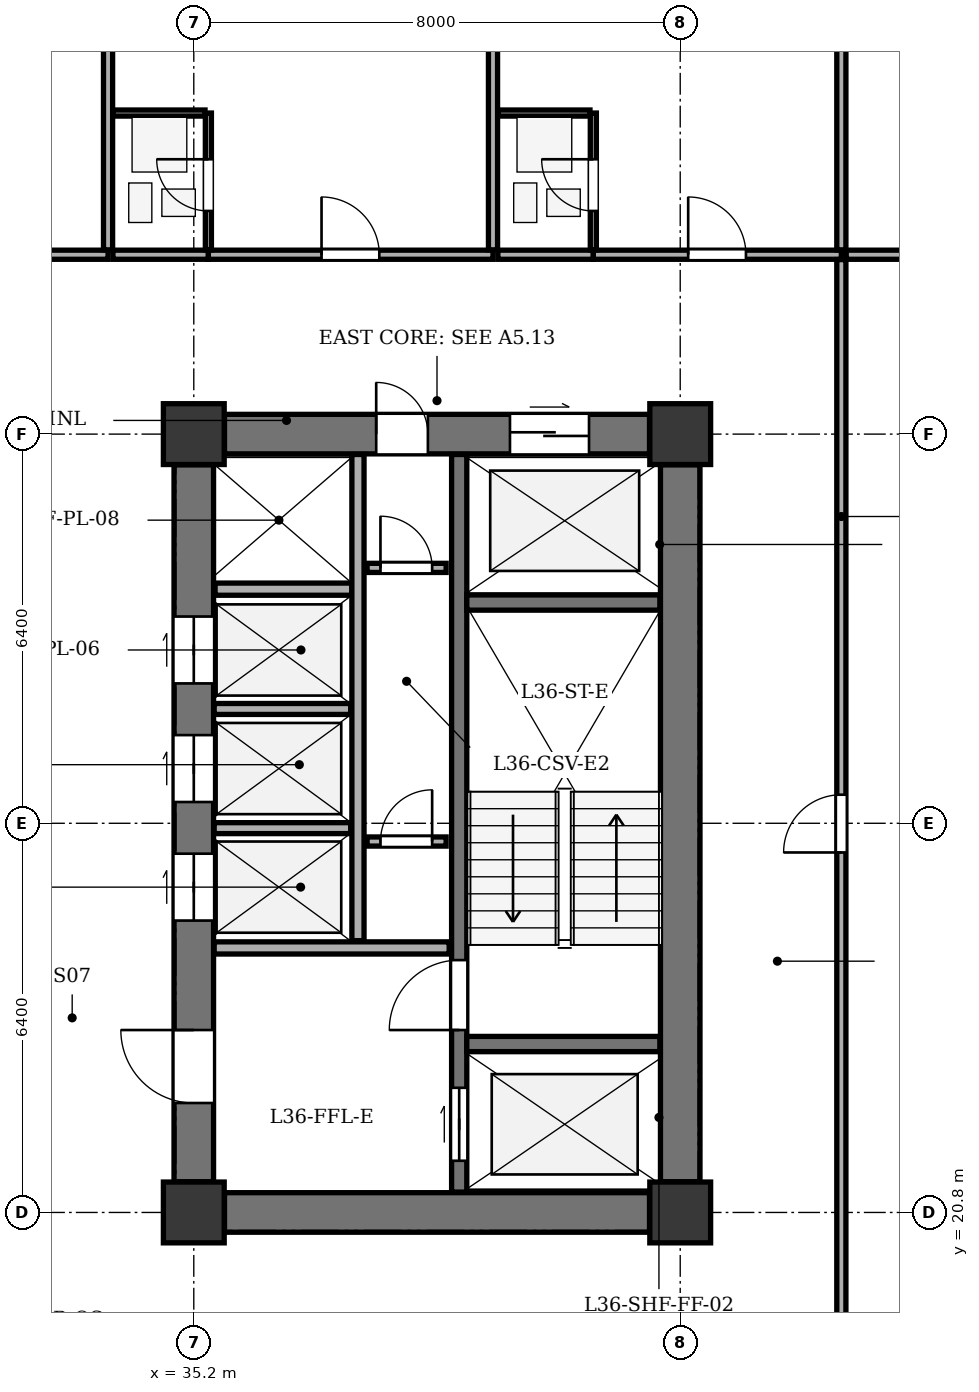
"""IFC4 building model, lengths in metres.
Left out: names, types, materials, properties, quantities, classifications, styles, units other than length and angle.
Written with IfcOpenShell. Run it as: python <this file> out.ifc"""

import sys

from ifc_helpers import new_model, si_unit, direction, frame, frame_2d, origin, origin_2d, place, context, subcontext, project, spatial, rectangle, extrude, element, fill, save


model = new_model("IFC4")
c1 = context("Model", 3, precision=1e-05, world=origin(), true_north=direction((0.0, 1.0)))
c2 = subcontext(c1, "Body", "Model", "MODEL_VIEW")
j1 = project(units=[si_unit("LENGTHUNIT", "METRE"), si_unit("PLANEANGLEUNIT", "RADIAN")], contexts=[c1])
p1 = place(None, origin())
s1 = spatial("IfcSite", under=j1, at=p1, CompositionType="ELEMENT")
p2 = place(p1, origin())
s2 = spatial("IfcBuilding", under=s1, at=p2, CompositionType="ELEMENT")
p3 = place(p2, frame((0.0, 0.0, 144.8)))
s3 = spatial("IfcBuildingStorey", under=s2, at=p3, CompositionType="ELEMENT", Elevation=144.8)
for number, where, z_axis, x_axis in (
    (1, (35.2, 20.8, 0.0), (0.0, 0.0, 1.0), (1.0, 0.0, 0.0)),
    (2, (43.2, 20.8, 0.0), (0.0, 0.0, 1.0), (1.0, 0.0, 0.0)),
    (3, (35.2, 33.6, 0.0), (0.0, 0.0, 1.0), (1.0, 0.0, 0.0)),
    (4, (43.2, 33.6, 0.0), (0.0, 0.0, 1.0), (1.0, 0.0, 0.0)),
):
    element("IfcColumn", number, at=place(p3, frame(where, z_axis=z_axis, x_axis=x_axis)), inside=s3, PredefinedType="COLUMN", context=c2, shape_type="SweptSolid", body=[
        extrude(rectangle(XDim=1.0, YDim=1.0, at=origin_2d()), origin(), (0.0, 0.0, 1.0), 3.5),
    ])
p4 = place(p3, frame((43.2, 21.305, 0.0), z_axis=(0.0, 0.0, 1.0), x_axis=(0.0, 1.0, 0.0)))
e5 = element("IfcWall", 5, at=p4, inside=s3, PredefinedType="SHEAR", context=c2, shape_type="SweptSolid", body=[
    extrude(rectangle(XDim=11.79, YDim=0.65, at=frame_2d((5.895, 0.0))), origin(), (0.0, 0.0, 1.0), 3.2),
])
p5 = place(p3, frame((35.705, 20.8, 0.0), z_axis=(0.0, 0.0, 1.0), x_axis=(1.0, 0.0, 0.0)))
e6 = element("IfcWall", 6, at=p5, inside=s3, PredefinedType="SHEAR", context=c2, shape_type="SweptSolid", body=[
    extrude(rectangle(XDim=6.99, YDim=0.65, at=frame_2d((3.495, 0.0))), origin(), (0.0, 0.0, 1.0), 3.2),
])
p6 = place(p3, frame((35.705, 33.6, 0.0), z_axis=(0.0, 0.0, 1.0), x_axis=(1.0, 0.0, 0.0)))
e7 = element("IfcWall", 7, at=p6, inside=s3, PredefinedType="SHEAR", context=c2, shape_type="SweptSolid", body=[
    extrude(rectangle(XDim=6.99, YDim=0.65, at=frame_2d((3.495, 0.0))), origin(), (0.0, 0.0, 1.0), 3.2),
])
p7 = place(p6, frame((4.695, 0.0, 0.0)))
e8 = element("IfcOpeningElement", 8, at=p7, cuts=e7, PredefinedType="OPENING", context=c2, shape_type="SweptSolid", body=[
    extrude(rectangle(XDim=1.3, YDim=2.15, at=frame_2d((0.65, 1.075))), frame((0.0, 0.335, 0.0), z_axis=(0.0, -1.0, 0.0), x_axis=(1.0, 0.0, 0.0)), (0.0, 0.0, 1.0), 0.67),
])
p8 = place(p6, frame((2.495, 0.0, 0.0)))
e9 = element("IfcOpeningElement", 9, at=p8, cuts=e7, PredefinedType="OPENING", context=c2, shape_type="SweptSolid", body=[
    extrude(rectangle(XDim=0.85, YDim=2.02, at=frame_2d((0.425, 1.01))), frame((0.0, 0.335, 0.0), z_axis=(0.0, -1.0, 0.0), x_axis=(1.0, 0.0, 0.0)), (0.0, 0.0, 1.0), 0.67),
])
p9 = place(p3, frame((35.2, 21.305, 0.0), z_axis=(0.0, 0.0, 1.0), x_axis=(0.0, 1.0, 0.0)))
e10 = element("IfcWall", 10, at=p9, inside=s3, PredefinedType="SHEAR", context=c2, shape_type="SweptSolid", body=[
    extrude(rectangle(XDim=11.79, YDim=0.65, at=frame_2d((5.895, 0.0))), origin(), (0.0, 0.0, 1.0), 3.2),
])
p10 = place(p9, frame((1.295, 0.0, 0.0)))
e11 = element("IfcOpeningElement", 11, at=p10, cuts=e10, PredefinedType="OPENING", context=c2, shape_type="SweptSolid", body=[
    extrude(rectangle(XDim=1.2, YDim=2.15, at=frame_2d((0.6, 1.075))), frame((0.0, 0.335, 0.0), z_axis=(0.0, -1.0, 0.0), x_axis=(1.0, 0.0, 0.0)), (0.0, 0.0, 1.0), 0.67),
])
p11 = place(p9, frame((4.295, 0.0, 0.0)))
e12 = element("IfcOpeningElement", 12, at=p11, cuts=e10, PredefinedType="OPENING", context=c2, shape_type="SweptSolid", body=[
    extrude(rectangle(XDim=1.1, YDim=2.1, at=frame_2d((0.55, 1.05))), frame((0.0, 0.335, 0.0), z_axis=(0.0, -1.0, 0.0), x_axis=(1.0, 0.0, 0.0)), (0.0, 0.0, 1.0), 0.67),
])
p12 = place(p9, frame((6.245, 0.0, 0.0)))
e13 = element("IfcOpeningElement", 13, at=p12, cuts=e10, PredefinedType="OPENING", context=c2, shape_type="SweptSolid", body=[
    extrude(rectangle(XDim=1.1, YDim=2.1, at=frame_2d((0.55, 1.05))), frame((0.0, 0.335, 0.0), z_axis=(0.0, -1.0, 0.0), x_axis=(1.0, 0.0, 0.0)), (0.0, 0.0, 1.0), 0.67),
])
p13 = place(p9, frame((8.195, 0.0, 0.0)))
e14 = element("IfcOpeningElement", 14, at=p13, cuts=e10, PredefinedType="OPENING", context=c2, shape_type="SweptSolid", body=[
    extrude(rectangle(XDim=1.1, YDim=2.1, at=frame_2d((0.55, 1.05))), frame((0.0, 0.335, 0.0), z_axis=(0.0, -1.0, 0.0), x_axis=(1.0, 0.0, 0.0)), (0.0, 0.0, 1.0), 0.67),
])
p14 = place(p3, frame((39.565, 21.135, 0.0), z_axis=(0.0, 0.0, 1.0), x_axis=(0.0, 1.0, 0.0)))
e15 = element("IfcWall", 15, at=p14, inside=s3, PredefinedType="SHEAR", context=c2, shape_type="SweptSolid", body=[
    extrude(rectangle(XDim=12.13, YDim=0.25, at=frame_2d((6.065, 0.0))), origin(), (0.0, 0.0, 1.0), 3.2),
])
p15 = place(p14, frame((0.515, 0.0, 0.0)))
e16 = element("IfcOpeningElement", 16, at=p15, cuts=e15, PredefinedType="OPENING", context=c2, shape_type="SweptSolid", body=[
    extrude(rectangle(XDim=1.2, YDim=2.15, at=frame_2d((0.6, 1.075))), frame((0.0, 0.135, 0.0), z_axis=(0.0, -1.0, 0.0), x_axis=(1.0, 0.0, 0.0)), (0.0, 0.0, 1.0), 0.27),
])
p16 = place(p14, frame((2.665, 0.0, 0.0)))
e17 = element("IfcOpeningElement", 17, at=p16, cuts=e15, PredefinedType="OPENING", context=c2, shape_type="SweptSolid", body=[
    extrude(rectangle(XDim=1.15, YDim=2.15, at=frame_2d((0.575, 1.075))), frame((0.0, 0.135, 0.0), z_axis=(0.0, -1.0, 0.0), x_axis=(1.0, 0.0, 0.0)), (0.0, 0.0, 1.0), 0.27),
])
for number, where, z_axis, x_axis in (
    (18, (39.69, 23.57, 0.0), (0.0, 0.0, 1.0), (1.0, 0.0, 0.0)),
    (19, (39.69, 30.83, 0.0), (0.0, 0.0, 1.0), (1.0, 0.0, 0.0)),
):
    element("IfcWall", number, at=place(p3, frame(where, z_axis=z_axis, x_axis=x_axis)), inside=s3, PredefinedType="SHEAR", context=c2, shape_type="SweptSolid", body=[
        extrude(rectangle(XDim=3.175, YDim=0.25, at=frame_2d((1.587, 0.0))), origin(), (0.0, 0.0, 1.0), 3.2),
    ])
p17 = place(p3, frame((35.535, 25.15, 0.0), z_axis=(0.0, 0.0, 1.0), x_axis=(1.0, 0.0, 0.0)))
e20 = element("IfcWall", 20, at=p17, inside=s3, PredefinedType="SOLIDWALL", context=c2, shape_type="SweptSolid", body=[
    extrude(rectangle(XDim=3.865, YDim=0.2, at=frame_2d((1.933, 0.0))), origin(), (0.0, 0.0, 1.0), 3.2),
])
p18 = place(p3, frame((35.55, 31.05, 0.0), z_axis=(0.0, 0.0, 1.0), x_axis=(1.0, 0.0, 0.0)))
e21 = element("IfcWall", 21, at=p18, inside=s3, PredefinedType="SOLIDWALL", context=c2, shape_type="SweptSolid", body=[
    extrude(rectangle(XDim=2.25, YDim=0.2, at=frame_2d((1.125, 0.0))), origin(), (0.0, 0.0, 1.0), 3.2),
])
p19 = place(p3, frame((37.9, 25.27, 0.0), z_axis=(0.0, 0.0, 1.0), x_axis=(0.0, 1.0, 0.0)))
e22 = element("IfcWall", 22, at=p19, inside=s3, PredefinedType="SOLIDWALL", context=c2, shape_type="SweptSolid", body=[
    extrude(rectangle(XDim=7.995, YDim=0.2, at=frame_2d((3.998, 0.0))), origin(), (0.0, 0.0, 1.0), 3.2),
])
for number, where, z_axis, x_axis in (
    (23, (35.535, 27.12, 0.0), (0.0, 0.0, 1.0), (1.0, 0.0, 0.0)),
    (24, (35.535, 29.08, 0.0), (0.0, 0.0, 1.0), (1.0, 0.0, 0.0)),
):
    element("IfcWall", number, at=place(p3, frame(where, z_axis=z_axis, x_axis=x_axis)), inside=s3, PredefinedType="PARTITIONING", context=c2, shape_type="SweptSolid", body=[
        extrude(rectangle(XDim=2.245, YDim=0.18, at=frame_2d((1.123, 0.0))), origin(), (0.0, 0.0, 1.0), 3.2),
    ])
p20 = place(p3, frame((38.05, 26.9, 0.0), z_axis=(0.0, 0.0, 1.0), x_axis=(1.0, 0.0, 0.0)))
e25 = element("IfcWall", 25, at=p20, inside=s3, PredefinedType="PARTITIONING", context=c2, shape_type="SweptSolid", body=[
    extrude(rectangle(XDim=1.3, YDim=0.15, at=frame_2d((0.65, 0.0))), origin(), (0.0, 0.0, 1.0), 3.2),
])
p21 = place(p20, frame((0.22, 0.0, 0.0)))
e26 = element("IfcOpeningElement", 26, at=p21, cuts=e25, PredefinedType="OPENING", context=c2, shape_type="SweptSolid", body=[
    extrude(rectangle(XDim=0.85, YDim=2.02, at=frame_2d((0.425, 1.01))), frame((0.0, 0.085, 0.0), z_axis=(0.0, -1.0, 0.0), x_axis=(1.0, 0.0, 0.0)), (0.0, 0.0, 1.0), 0.17),
])
p22 = place(p3, frame((38.05, 31.4, 0.0), z_axis=(0.0, 0.0, 1.0), x_axis=(1.0, 0.0, 0.0)))
e27 = element("IfcWall", 27, at=p22, inside=s3, PredefinedType="PARTITIONING", context=c2, shape_type="SweptSolid", body=[
    extrude(rectangle(XDim=1.3, YDim=0.15, at=frame_2d((0.65, 0.0))), origin(), (0.0, 0.0, 1.0), 3.2),
])
p23 = place(p22, frame((0.22, 0.0, 0.0)))
e28 = element("IfcOpeningElement", 28, at=p23, cuts=e27, PredefinedType="OPENING", context=c2, shape_type="SweptSolid", body=[
    extrude(rectangle(XDim=0.85, YDim=2.02, at=frame_2d((0.425, 1.01))), frame((0.0, 0.085, 0.0), z_axis=(0.0, -1.0, 0.0), x_axis=(1.0, 0.0, 0.0)), (0.0, 0.0, 1.0), 0.17),
])
p24 = place(p3, frame((29.109, 36.55, 0.0), z_axis=(0.0, 0.0, 1.0), x_axis=(1.0, 0.0, 0.0)))
e29 = element("IfcWall", 29, at=p24, inside=s3, PredefinedType="PARTITIONING", context=c2, shape_type="SweptSolid", body=[
    extrude(rectangle(XDim=4.681, YDim=0.15, at=frame_2d((2.341, 0.0))), origin(), (0.0, 0.0, 1.0), 3.2),
])
p25 = place(p24, frame((1.861, 0.0, 0.0)))
e30 = element("IfcOpeningElement", 30, at=p25, cuts=e29, PredefinedType="OPENING", context=c2, shape_type="SweptSolid", body=[
    extrude(rectangle(XDim=0.95, YDim=2.1, at=frame_2d((0.475, 1.05))), frame((0.0, 0.085, 0.0), z_axis=(0.0, -1.0, 0.0), x_axis=(1.0, 0.0, 0.0)), (0.0, 0.0, 1.0), 0.17),
])
p26 = place(p3, frame((33.79, 36.63, 0.0), z_axis=(0.0, 0.0, 1.0), x_axis=(0.0, 1.0, 0.0)))
e31 = element("IfcWall", 31, at=p26, inside=s3, PredefinedType="PARTITIONING", context=c2, shape_type="SweptSolid", body=[
    extrude(rectangle(XDim=9.495, YDim=0.15, at=frame_2d((4.748, 0.0))), origin(), (0.0, 0.0, 1.0), 2.785),
])
p27 = place(p3, frame((33.87, 36.55, 0.0), z_axis=(0.0, 0.0, 1.0), x_axis=(1.0, 0.0, 0.0)))
e32 = element("IfcWall", 32, at=p27, inside=s3, PredefinedType="PARTITIONING", context=c2, shape_type="SweptSolid", body=[
    extrude(rectangle(XDim=1.57, YDim=0.15, at=frame_2d((0.785, 0.0))), origin(), (0.0, 0.0, 1.0), 3.2),
])
p28 = place(p3, frame((35.44, 36.55, 0.0), z_axis=(0.0, 0.0, 1.0), x_axis=(1.0, 0.0, 0.0)))
e33 = element("IfcWall", 33, at=p28, inside=s3, PredefinedType="PARTITIONING", context=c2, shape_type="SweptSolid", body=[
    extrude(rectangle(XDim=4.681, YDim=0.15, at=frame_2d((2.341, 0.0))), origin(), (0.0, 0.0, 1.0), 3.2),
])
p29 = place(p28, frame((1.861, 0.0, 0.0)))
e34 = element("IfcOpeningElement", 34, at=p29, cuts=e33, PredefinedType="OPENING", context=c2, shape_type="SweptSolid", body=[
    extrude(rectangle(XDim=0.95, YDim=2.1, at=frame_2d((0.475, 1.05))), frame((0.0, 0.085, 0.0), z_axis=(0.0, -1.0, 0.0), x_axis=(1.0, 0.0, 0.0)), (0.0, 0.0, 1.0), 0.17),
])
p30 = place(p3, frame((35.44, 36.63, 0.0), z_axis=(0.0, 0.0, 1.0), x_axis=(0.0, 1.0, 0.0)))
e35 = element("IfcWall", 35, at=p30, inside=s3, PredefinedType="PARTITIONING", context=c2, shape_type="SweptSolid", body=[
    extrude(rectangle(XDim=2.25, YDim=0.1, at=frame_2d((1.125, 0.0))), origin(), (0.0, 0.0, 1.0), 2.535),
])
p31 = place(p30, frame((0.64, 0.0, 0.0)))
e36 = element("IfcOpeningElement", 36, at=p31, cuts=e35, PredefinedType="OPENING", context=c2, shape_type="SweptSolid", body=[
    extrude(rectangle(XDim=0.85, YDim=2.05, at=frame_2d((0.425, 1.025))), frame((0.0, 0.06, 0.0), z_axis=(0.0, -1.0, 0.0), x_axis=(1.0, 0.0, 0.0)), (0.0, 0.0, 1.0), 0.12),
])
p32 = place(p3, frame((33.87, 38.88, 0.0), z_axis=(0.0, 0.0, 1.0), x_axis=(1.0, 0.0, 0.0)))
e37 = element("IfcWall", 37, at=p32, inside=s3, PredefinedType="PARTITIONING", context=c2, shape_type="SweptSolid", body=[
    extrude(rectangle(XDim=1.515, YDim=0.1, at=frame_2d((0.757, 0.0))), origin(), (0.0, 0.0, 1.0), 3.2),
])
p33 = place(p3, frame((40.121, 36.63, 0.0), z_axis=(0.0, 0.0, 1.0), x_axis=(0.0, 1.0, 0.0)))
e38 = element("IfcWall", 38, at=p33, inside=s3, PredefinedType="PARTITIONING", context=c2, shape_type="SweptSolid", body=[
    extrude(rectangle(XDim=9.495, YDim=0.15, at=frame_2d((4.748, 0.0))), origin(), (0.0, 0.0, 1.0), 3.2),
])
p34 = place(p3, frame((40.201, 36.55, 0.0), z_axis=(0.0, 0.0, 1.0), x_axis=(1.0, 0.0, 0.0)))
e39 = element("IfcWall", 39, at=p34, inside=s3, PredefinedType="PARTITIONING", context=c2, shape_type="SweptSolid", body=[
    extrude(rectangle(XDim=1.57, YDim=0.15, at=frame_2d((0.785, 0.0))), origin(), (0.0, 0.0, 1.0), 3.2),
])
p35 = place(p3, frame((41.771, 36.55, 0.0), z_axis=(0.0, 0.0, 1.0), x_axis=(1.0, 0.0, 0.0)))
e40 = element("IfcWall", 40, at=p35, inside=s3, PredefinedType="PARTITIONING", context=c2, shape_type="SweptSolid", body=[
    extrude(rectangle(XDim=4.079, YDim=0.15, at=frame_2d((2.04, 0.0))), origin(), (0.0, 0.0, 1.0), 3.2),
])
p36 = place(p35, frame((1.56, 0.0, 0.0)))
e41 = element("IfcOpeningElement", 41, at=p36, cuts=e40, PredefinedType="OPENING", context=c2, shape_type="SweptSolid", body=[
    extrude(rectangle(XDim=0.95, YDim=2.1, at=frame_2d((0.475, 1.05))), frame((0.0, 0.085, 0.0), z_axis=(0.0, -1.0, 0.0), x_axis=(1.0, 0.0, 0.0)), (0.0, 0.0, 1.0), 0.17),
])
p37 = place(p3, frame((41.771, 36.63, 0.0), z_axis=(0.0, 0.0, 1.0), x_axis=(0.0, 1.0, 0.0)))
e42 = element("IfcWall", 42, at=p37, inside=s3, PredefinedType="PARTITIONING", context=c2, shape_type="SweptSolid", body=[
    extrude(rectangle(XDim=2.25, YDim=0.1, at=frame_2d((1.125, 0.0))), origin(), (0.0, 0.0, 1.0), 3.2),
])
p38 = place(p37, frame((0.64, 0.0, 0.0)))
e43 = element("IfcOpeningElement", 43, at=p38, cuts=e42, PredefinedType="OPENING", context=c2, shape_type="SweptSolid", body=[
    extrude(rectangle(XDim=0.85, YDim=2.05, at=frame_2d((0.425, 1.025))), frame((0.0, 0.06, 0.0), z_axis=(0.0, -1.0, 0.0), x_axis=(1.0, 0.0, 0.0)), (0.0, 0.0, 1.0), 0.12),
])
p39 = place(p3, frame((40.201, 38.88, 0.0), z_axis=(0.0, 0.0, 1.0), x_axis=(1.0, 0.0, 0.0)))
e44 = element("IfcWall", 44, at=p39, inside=s3, PredefinedType="PARTITIONING", context=c2, shape_type="SweptSolid", body=[
    extrude(rectangle(XDim=1.515, YDim=0.1, at=frame_2d((0.758, 0.0))), origin(), (0.0, 0.0, 1.0), 3.2),
])
p40 = place(p3, frame((45.85, 36.63, 0.0), z_axis=(0.0, 0.0, 1.0), x_axis=(0.0, 1.0, 0.0)))
e45 = element("IfcWall", 45, at=p40, inside=s3, PredefinedType="PARTITIONING", context=c2, shape_type="SweptSolid", body=[
    extrude(rectangle(XDim=9.495, YDim=0.15, at=frame_2d((4.748, 0.0))), origin(), (0.0, 0.0, 1.0), 3.2),
])
p41 = place(p3, frame((45.93, 36.55, 0.0), z_axis=(0.0, 0.0, 1.0), x_axis=(1.0, 0.0, 0.0)))
e46 = element("IfcWall", 46, at=p41, inside=s3, PredefinedType="PARTITIONING", context=c2, shape_type="SweptSolid", body=[
    extrude(rectangle(XDim=9.395, YDim=0.15, at=frame_2d((4.698, 0.0))), origin(), (0.0, 0.0, 1.0), 3.2),
])
p42 = place(p3, frame((45.85, 17.93, 0.0), z_axis=(0.0, 0.0, 1.0), x_axis=(0.0, 1.0, 0.0)))
e47 = element("IfcWall", 47, at=p42, inside=s3, PredefinedType="PARTITIONING", context=c2, shape_type="SweptSolid", body=[
    extrude(rectangle(XDim=18.54, YDim=0.15, at=frame_2d((9.27, 0.0))), origin(), (0.0, 0.0, 1.0), 3.2),
])
p43 = place(p42, frame((8.79, 0.0, 0.0)))
e48 = element("IfcOpeningElement", 48, at=p43, cuts=e47, PredefinedType="OPENING", context=c2, shape_type="SweptSolid", body=[
    extrude(rectangle(XDim=0.95, YDim=2.1, at=frame_2d((0.475, 1.05))), frame((0.0, 0.085, 0.0), z_axis=(0.0, -1.0, 0.0), x_axis=(1.0, 0.0, 0.0)), (0.0, 0.0, 1.0), 0.17),
])
p44 = place(p7, origin())
e49 = element("IfcDoor", 49, at=p44, inside=s3, OperationType="DOUBLE_DOOR_SLIDING", PredefinedType="DOOR", context=c2, shape_type="SweptSolid", body=[
    extrude(rectangle(XDim=1.3, YDim=2.15, at=frame_2d((0.65, 1.075))), frame((0.0, 0.025, 0.0), z_axis=(0.0, -1.0, 0.0), x_axis=(1.0, 0.0, 0.0)), (0.0, 0.0, 1.0), 0.05),
])
fill(e8, e49)
p45 = place(p8, origin())
e50 = element("IfcDoor", 50, at=p45, inside=s3, OperationType="SINGLE_SWING_LEFT", PredefinedType="DOOR", context=c2, shape_type="SweptSolid", body=[
    extrude(rectangle(XDim=0.85, YDim=2.02, at=frame_2d((0.425, 1.01))), frame((0.0, 0.025, 0.0), z_axis=(0.0, -1.0, 0.0), x_axis=(1.0, 0.0, 0.0)), (0.0, 0.0, 1.0), 0.05),
])
fill(e9, e50)
p46 = place(p10, origin())
e51 = element("IfcDoor", 51, at=p46, inside=s3, OperationType="SINGLE_SWING_RIGHT", PredefinedType="DOOR", context=c2, shape_type="SweptSolid", body=[
    extrude(rectangle(XDim=1.2, YDim=2.15, at=frame_2d((0.6, 1.075))), frame((0.0, 0.025, 0.0), z_axis=(0.0, -1.0, 0.0), x_axis=(1.0, 0.0, 0.0)), (0.0, 0.0, 1.0), 0.05),
])
fill(e11, e51)
p47 = place(p11, origin())
e52 = element("IfcDoor", 52, at=p47, inside=s3, OperationType="DOUBLE_DOOR_SLIDING", PredefinedType="DOOR", context=c2, shape_type="SweptSolid", body=[
    extrude(rectangle(XDim=1.1, YDim=2.1, at=frame_2d((0.55, 1.05))), frame((0.0, 0.025, 0.0), z_axis=(0.0, -1.0, 0.0), x_axis=(1.0, 0.0, 0.0)), (0.0, 0.0, 1.0), 0.05),
])
fill(e12, e52)
p48 = place(p12, origin())
e53 = element("IfcDoor", 53, at=p48, inside=s3, OperationType="DOUBLE_DOOR_SLIDING", PredefinedType="DOOR", context=c2, shape_type="SweptSolid", body=[
    extrude(rectangle(XDim=1.1, YDim=2.1, at=frame_2d((0.55, 1.05))), frame((0.0, 0.025, 0.0), z_axis=(0.0, -1.0, 0.0), x_axis=(1.0, 0.0, 0.0)), (0.0, 0.0, 1.0), 0.05),
])
fill(e13, e53)
p49 = place(p13, origin())
e54 = element("IfcDoor", 54, at=p49, inside=s3, OperationType="DOUBLE_DOOR_SLIDING", PredefinedType="DOOR", context=c2, shape_type="SweptSolid", body=[
    extrude(rectangle(XDim=1.1, YDim=2.1, at=frame_2d((0.55, 1.05))), frame((0.0, 0.025, 0.0), z_axis=(0.0, -1.0, 0.0), x_axis=(1.0, 0.0, 0.0)), (0.0, 0.0, 1.0), 0.05),
])
fill(e14, e54)
p50 = place(p15, origin())
e55 = element("IfcDoor", 55, at=p50, inside=s3, OperationType="DOUBLE_DOOR_SLIDING", PredefinedType="DOOR", context=c2, shape_type="SweptSolid", body=[
    extrude(rectangle(XDim=1.2, YDim=2.15, at=frame_2d((0.6, 1.075))), frame((0.0, 0.025, 0.0), z_axis=(0.0, -1.0, 0.0), x_axis=(1.0, 0.0, 0.0)), (0.0, 0.0, 1.0), 0.05),
])
fill(e16, e55)
p51 = place(p16, origin())
e56 = element("IfcDoor", 56, at=p51, inside=s3, OperationType="SINGLE_SWING_LEFT", PredefinedType="DOOR", context=c2, shape_type="SweptSolid", body=[
    extrude(rectangle(XDim=1.15, YDim=2.15, at=frame_2d((0.575, 1.075))), frame((0.0, 0.025, 0.0), z_axis=(0.0, -1.0, 0.0), x_axis=(1.0, 0.0, 0.0)), (0.0, 0.0, 1.0), 0.05),
])
fill(e17, e56)
p52 = place(p21, origin())
e57 = element("IfcDoor", 57, at=p52, inside=s3, OperationType="SINGLE_SWING_RIGHT", PredefinedType="DOOR", context=c2, shape_type="SweptSolid", body=[
    extrude(rectangle(XDim=0.85, YDim=2.02, at=frame_2d((0.425, 1.01))), frame((0.0, 0.025, 0.0), z_axis=(0.0, -1.0, 0.0), x_axis=(1.0, 0.0, 0.0)), (0.0, 0.0, 1.0), 0.05),
])
fill(e26, e57)
p53 = place(p23, origin())
e58 = element("IfcDoor", 58, at=p53, inside=s3, OperationType="SINGLE_SWING_LEFT", PredefinedType="DOOR", context=c2, shape_type="SweptSolid", body=[
    extrude(rectangle(XDim=0.85, YDim=2.02, at=frame_2d((0.425, 1.01))), frame((0.0, 0.025, 0.0), z_axis=(0.0, -1.0, 0.0), x_axis=(1.0, 0.0, 0.0)), (0.0, 0.0, 1.0), 0.05),
])
fill(e28, e58)
p54 = place(p31, origin())
e59 = element("IfcDoor", 59, at=p54, inside=s3, OperationType="SINGLE_SWING_RIGHT", PredefinedType="DOOR", context=c2, shape_type="SweptSolid", body=[
    extrude(rectangle(XDim=0.85, YDim=2.05, at=frame_2d((0.425, 1.025))), frame((0.0, 0.025, 0.0), z_axis=(0.0, -1.0, 0.0), x_axis=(1.0, 0.0, 0.0)), (0.0, 0.0, 1.0), 0.05),
])
fill(e36, e59)
p55 = place(p29, origin())
e60 = element("IfcDoor", 60, at=p55, inside=s3, OperationType="SINGLE_SWING_LEFT", PredefinedType="DOOR", context=c2, shape_type="SweptSolid", body=[
    extrude(rectangle(XDim=0.95, YDim=2.1, at=frame_2d((0.475, 1.05))), frame((0.0, 0.025, 0.0), z_axis=(0.0, -1.0, 0.0), x_axis=(1.0, 0.0, 0.0)), (0.0, 0.0, 1.0), 0.05),
])
fill(e34, e60)
p56 = place(p38, origin())
e61 = element("IfcDoor", 61, at=p56, inside=s3, OperationType="SINGLE_SWING_RIGHT", PredefinedType="DOOR", context=c2, shape_type="SweptSolid", body=[
    extrude(rectangle(XDim=0.85, YDim=2.05, at=frame_2d((0.425, 1.025))), frame((0.0, 0.025, 0.0), z_axis=(0.0, -1.0, 0.0), x_axis=(1.0, 0.0, 0.0)), (0.0, 0.0, 1.0), 0.05),
])
fill(e43, e61)
p57 = place(p36, origin())
e62 = element("IfcDoor", 62, at=p57, inside=s3, OperationType="SINGLE_SWING_LEFT", PredefinedType="DOOR", context=c2, shape_type="SweptSolid", body=[
    extrude(rectangle(XDim=0.95, YDim=2.1, at=frame_2d((0.475, 1.05))), frame((0.0, 0.025, 0.0), z_axis=(0.0, -1.0, 0.0), x_axis=(1.0, 0.0, 0.0)), (0.0, 0.0, 1.0), 0.05),
])
fill(e41, e62)
p58 = place(p43, origin())
e63 = element("IfcDoor", 63, at=p58, inside=s3, OperationType="SINGLE_SWING_LEFT", PredefinedType="DOOR", context=c2, shape_type="SweptSolid", body=[
    extrude(rectangle(XDim=0.95, YDim=2.1, at=frame_2d((0.475, 1.05))), frame((0.0, 0.025, 0.0), z_axis=(0.0, -1.0, 0.0), x_axis=(1.0, 0.0, 0.0)), (0.0, 0.0, 1.0), 0.05),
])
fill(e48, e63)
save(model, sys.argv[1])
